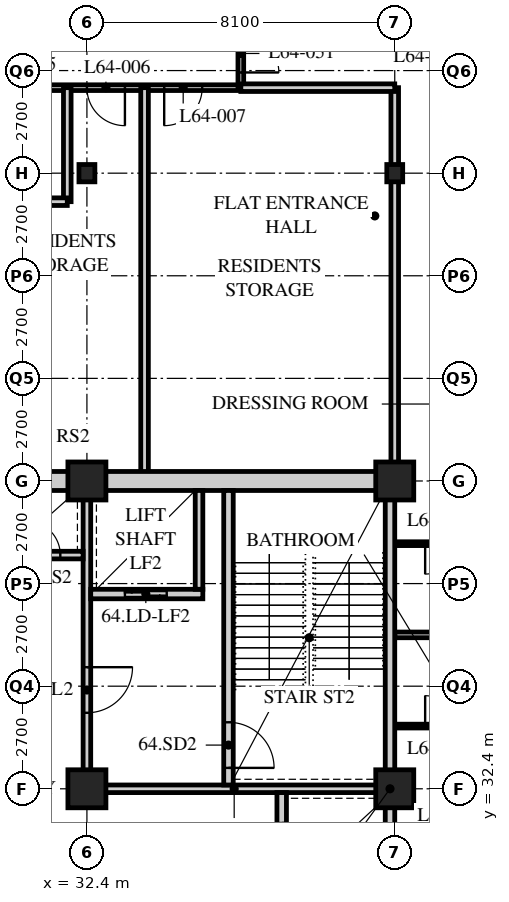
"""IFC4 building model, lengths in metres.
Left out: names, types, materials, properties, quantities, classifications, styles, units other than length and angle.
Written with IfcOpenShell. Run it as: python <this file> out.ifc"""

import sys

from ifc_helpers import new_model, si_unit, direction, frame, frame_2d, origin, origin_2d, place, context, subcontext, project, spatial, rectangle, hollow_rectangle, i_section, extrude, element, fill, save


model = new_model("IFC4")
c1 = context("Model", 3, precision=1e-05, world=origin(), true_north=direction((0.0, 1.0)))
c2 = subcontext(c1, "Body", "Model", "MODEL_VIEW")
j1 = project(units=[si_unit("LENGTHUNIT", "METRE"), si_unit("PLANEANGLEUNIT", "RADIAN")], contexts=[c1])
p1 = place(None, origin())
s1 = spatial("IfcSite", under=j1, at=p1, CompositionType="ELEMENT")
p2 = place(p1, origin())
s2 = spatial("IfcBuilding", under=s1, at=p2, CompositionType="ELEMENT")
p3 = place(p2, frame((0.0, 0.0, 250.2)))
s3 = spatial("IfcBuildingStorey", under=s2, at=p3, CompositionType="ELEMENT", Elevation=250.2)
for number, where, z_axis, x_axis in (
    (1, (32.4, 32.4, 0.0), (0.0, 0.0, 1.0), (1.0, 0.0, 0.0)),
    (2, (32.4, 40.5, 0.0), (0.0, 0.0, 1.0), (1.0, 0.0, 0.0)),
):
    element("IfcColumn", number, at=place(p3, frame(where, z_axis=z_axis, x_axis=x_axis)), inside=s3, PredefinedType="COLUMN", context=c2, shape_type="SweptSolid", body=[
        extrude(hollow_rectangle(XDim=1.0, YDim=1.0, WallThickness=0.1, at=origin_2d()), origin(), (0.0, 0.0, 1.0), 3.9),
    ])
p4 = place(p3, frame((32.4, 48.6, 0.0), z_axis=(0.0, 0.0, 1.0), x_axis=(1.0, 0.0, 0.0)))
e3 = element("IfcColumn", 3, at=p4, inside=s3, PredefinedType="COLUMN", context=c2, shape_type="SweptSolid", body=[
    extrude(i_section(OverallWidth=0.418, OverallDepth=0.456, WebThickness=0.042, FlangeThickness=0.067, FilletRadius=0.015, at=origin_2d()), origin(), (0.0, 0.0, 1.0), 3.9),
])
for number, where, z_axis, x_axis in (
    (4, (40.5, 32.4, 0.0), (0.0, 0.0, 1.0), (1.0, 0.0, 0.0)),
    (5, (40.5, 40.5, 0.0), (0.0, 0.0, 1.0), (1.0, 0.0, 0.0)),
):
    element("IfcColumn", number, at=place(p3, frame(where, z_axis=z_axis, x_axis=x_axis)), inside=s3, PredefinedType="COLUMN", context=c2, shape_type="SweptSolid", body=[
        extrude(hollow_rectangle(XDim=1.0, YDim=1.0, WallThickness=0.1, at=origin_2d()), origin(), (0.0, 0.0, 1.0), 3.9),
    ])
p5 = place(p3, frame((40.5, 48.6, 0.0), z_axis=(0.0, 0.0, 1.0), x_axis=(1.0, 0.0, 0.0)))
e6 = element("IfcColumn", 6, at=p5, inside=s3, PredefinedType="COLUMN", context=c2, shape_type="SweptSolid", body=[
    extrude(i_section(OverallWidth=0.418, OverallDepth=0.456, WebThickness=0.042, FlangeThickness=0.067, FilletRadius=0.015, at=origin_2d()), origin(), (0.0, 0.0, 1.0), 3.9),
])
p6 = place(p3, frame((29.56, 50.85, 0.0), z_axis=(0.0, 0.0, 1.0), x_axis=(1.0, 0.0, 0.0)))
e7 = element("IfcWall", 7, at=p6, inside=s3, PredefinedType="PARTITIONING", context=c2, shape_type="SweptSolid", body=[
    extrude(rectangle(XDim=6.89, YDim=0.15, at=frame_2d((3.445, 0.0))), origin(), (0.0, 0.0, 1.0), 3.69),
])
p7 = place(p6, frame((0.657, 0.0, 0.0)))
e8 = element("IfcOpeningElement", 8, at=p7, cuts=e7, PredefinedType="OPENING", context=c2, shape_type="SweptSolid", body=[
    extrude(rectangle(XDim=1.0, YDim=2.1, at=frame_2d((0.5, 1.05))), frame((0.0, 0.085, 0.0), z_axis=(0.0, -1.0, 0.0), x_axis=(1.0, 0.0, 0.0)), (0.0, 0.0, 1.0), 0.17),
])
p8 = place(p6, frame((2.84, 0.0, 0.0)))
e9 = element("IfcOpeningElement", 9, at=p8, cuts=e7, PredefinedType="OPENING", context=c2, shape_type="SweptSolid", body=[
    extrude(rectangle(XDim=1.0, YDim=2.1, at=frame_2d((0.5, 1.05))), frame((0.0, 0.085, 0.0), z_axis=(0.0, -1.0, 0.0), x_axis=(1.0, 0.0, 0.0)), (0.0, 0.0, 1.0), 0.17),
])
p9 = place(p6, frame((4.873, 0.0, 0.0)))
e10 = element("IfcOpeningElement", 10, at=p9, cuts=e7, PredefinedType="OPENING", context=c2, shape_type="SweptSolid", body=[
    extrude(rectangle(XDim=1.0, YDim=2.1, at=frame_2d((0.5, 1.05))), frame((0.0, 0.085, 0.0), z_axis=(0.0, -1.0, 0.0), x_axis=(1.0, 0.0, 0.0)), (0.0, 0.0, 1.0), 0.17),
])
p10 = place(p3, frame((31.883, 50.85, 0.0), z_axis=(0.0, 0.0, 1.0), x_axis=(0.0, -1.0, 0.0)))
e11 = element("IfcWall", 11, at=p10, inside=s3, PredefinedType="SOLIDWALL", context=c2, shape_type="SweptSolid", body=[
    extrude(rectangle(XDim=3.0, YDim=0.2, at=frame_2d((1.5, 0.0))), origin(), (0.0, 0.0, 1.0), 3.69),
])
p11 = place(p3, frame((29.55, 47.85, 0.0), z_axis=(0.0, 0.0, 1.0), x_axis=(1.0, 0.0, 0.0)))
e12 = element("IfcWall", 12, at=p11, inside=s3, PredefinedType="SOLIDWALL", context=c2, shape_type="SweptSolid", body=[
    extrude(rectangle(XDim=2.333, YDim=0.2, at=frame_2d((1.167, 0.0))), origin(), (0.0, 0.0, 1.0), 3.69),
])
p12 = place(p3, frame((33.917, 50.85, 0.0), z_axis=(0.0, 0.0, 1.0), x_axis=(0.0, -1.0, 0.0)))
e13 = element("IfcWall", 13, at=p12, inside=s3, PredefinedType="SOLIDWALL", context=c2, shape_type="SweptSolid", body=[
    extrude(rectangle(XDim=10.35, YDim=0.2, at=frame_2d((5.175, 0.0))), origin(), (0.0, 0.0, 1.0), 3.69),
])
p13 = place(p3, frame((36.45, 50.85, 0.0), z_axis=(0.0, 0.0, 1.0), x_axis=(0.0, 1.0, 0.0)))
e14 = element("IfcWall", 14, at=p13, inside=s3, PredefinedType="PARTITIONING", context=c2, shape_type="SweptSolid", body=[
    extrude(rectangle(XDim=1.8, YDim=0.15, at=frame_2d((0.9, 0.0))), origin(), (0.0, 0.0, 1.0), 3.69),
])
p14 = place(p13, frame((0.4, 0.0, 0.0)))
e15 = element("IfcOpeningElement", 15, at=p14, cuts=e14, PredefinedType="OPENING", context=c2, shape_type="SweptSolid", body=[
    extrude(rectangle(XDim=1.0, YDim=2.1, at=frame_2d((0.5, 1.05))), frame((0.0, 0.085, 0.0), z_axis=(0.0, -1.0, 0.0), x_axis=(1.0, 0.0, 0.0)), (0.0, 0.0, 1.0), 0.17),
])
p15 = place(p3, frame((40.5, 40.5, 0.0), z_axis=(0.0, 0.0, 1.0), x_axis=(0.0, 1.0, 0.0)))
e16 = element("IfcWall", 16, at=p15, inside=s3, PredefinedType="SOLIDWALL", context=c2, shape_type="SweptSolid", body=[
    extrude(rectangle(XDim=10.35, YDim=0.2, at=frame_2d((5.175, 0.0))), origin(), (0.0, 0.0, 1.0), 3.078),
])
p16 = place(p3, frame((40.5, 34.05, 0.0), z_axis=(0.0, 0.0, 1.0), x_axis=(1.0, 0.0, 0.0)))
e17 = element("IfcWall", 17, at=p16, inside=s3, PredefinedType="PARTITIONING", context=c2, shape_type="SweptSolid", body=[
    extrude(rectangle(XDim=2.4, YDim=0.1, at=frame_2d((1.2, 0.0))), origin(), (0.0, 0.0, 1.0), 3.69),
])
p17 = place(p16, frame((0.8, 0.0, 0.0)))
e18 = element("IfcOpeningElement", 18, at=p17, cuts=e17, PredefinedType="OPENING", context=c2, shape_type="SweptSolid", body=[
    extrude(rectangle(XDim=0.8, YDim=2.1, at=frame_2d((0.4, 1.05))), frame((0.0, 0.06, 0.0), z_axis=(0.0, -1.0, 0.0), x_axis=(1.0, 0.0, 0.0)), (0.0, 0.0, 1.0), 0.12),
])
p18 = place(p3, frame((40.5, 36.45, 0.0), z_axis=(0.0, 0.0, 1.0), x_axis=(1.0, 0.0, 0.0)))
e19 = element("IfcWall", 19, at=p18, inside=s3, PredefinedType="PARTITIONING", context=c2, shape_type="SweptSolid", body=[
    extrude(rectangle(XDim=15.9, YDim=0.15, at=frame_2d((7.95, 0.0))), origin(), (0.0, 0.0, 1.0), 3.69),
])
p19 = place(p3, frame((40.5, 38.85, 0.0), z_axis=(0.0, 0.0, 1.0), x_axis=(1.0, 0.0, 0.0)))
e20 = element("IfcWall", 20, at=p19, inside=s3, PredefinedType="PARTITIONING", context=c2, shape_type="SweptSolid", body=[
    extrude(rectangle(XDim=2.4, YDim=0.1, at=frame_2d((1.2, 0.0))), origin(), (0.0, 0.0, 1.0), 3.69),
])
p20 = place(p19, frame((0.8, 0.0, 0.0)))
e21 = element("IfcOpeningElement", 21, at=p20, cuts=e20, PredefinedType="OPENING", context=c2, shape_type="SweptSolid", body=[
    extrude(rectangle(XDim=0.8, YDim=2.1, at=frame_2d((0.4, 1.05))), frame((0.0, 0.06, 0.0), z_axis=(0.0, -1.0, 0.0), x_axis=(1.0, 0.0, 0.0)), (0.0, 0.0, 1.0), 0.12),
])
p21 = place(p3, frame((36.45, 50.85, 0.0), z_axis=(0.0, 0.0, 1.0), x_axis=(1.0, 0.0, 0.0)))
e22 = element("IfcWall", 22, at=p21, inside=s3, PredefinedType="SOLIDWALL", context=c2, shape_type="SweptSolid", body=[
    extrude(rectangle(XDim=4.05, YDim=0.2, at=frame_2d((2.025, 0.0))), origin(), (0.0, 0.0, 1.0), 3.69),
])
p22 = place(p3, frame((15.95, 40.5, 0.0), z_axis=(0.0, 0.0, 1.0), x_axis=(1.0, 0.0, 0.0)))
e23 = element("IfcWall", 23, at=p22, inside=s3, PredefinedType="SOLIDWALL", context=c2, shape_type="SweptSolid", body=[
    extrude(rectangle(XDim=24.55, YDim=0.5, at=frame_2d((12.275, 0.0))), origin(), (0.0, 0.0, 1.0), 3.04),
])
p23 = place(p22, frame((11.5, 0.0, 0.0)))
e24 = element("IfcOpeningElement", 24, at=p23, cuts=e23, PredefinedType="OPENING", context=c2, shape_type="SweptSolid", body=[
    extrude(rectangle(XDim=1.8, YDim=2.4, at=frame_2d((0.9, 1.2))), frame((0.0, 0.26, 0.0), z_axis=(0.0, -1.0, 0.0), x_axis=(1.0, 0.0, 0.0)), (0.0, 0.0, 1.0), 0.52),
])
p24 = place(p3, frame((40.375, 24.55, 0.0), z_axis=(0.0, 0.0, 1.0), x_axis=(0.0, 1.0, 0.0)))
e25 = element("IfcWall", 25, at=p24, inside=s3, PredefinedType="SOLIDWALL", context=c2, shape_type="SweptSolid", body=[
    extrude(rectangle(XDim=15.7, YDim=0.25, at=frame_2d((7.85, 0.0))), origin(), (0.0, 0.0, 1.0), 3.078),
])
p25 = place(p3, frame((32.3, 32.4, 0.0), z_axis=(0.0, 0.0, 1.0), x_axis=(1.0, 0.0, 0.0)))
e26 = element("IfcWall", 26, at=p25, inside=s3, PredefinedType="SOLIDWALL", context=c2, shape_type="SweptSolid", body=[
    extrude(rectangle(XDim=7.95, YDim=0.2, at=frame_2d((3.975, 0.0))), origin(), (0.0, 0.0, 1.0), 3.078),
])
p26 = place(p3, frame((32.4, 32.5, 0.0), z_axis=(0.0, 0.0, 1.0), x_axis=(0.0, 1.0, 0.0)))
e27 = element("IfcWall", 27, at=p26, inside=s3, PredefinedType="SOLIDWALL", context=c2, shape_type="SweptSolid", body=[
    extrude(rectangle(XDim=7.75, YDim=0.2, at=frame_2d((3.875, 0.0))), origin(), (0.0, 0.0, 1.0), 3.078),
])
p27 = place(p26, frame((1.9, 0.0, 0.0)))
e28 = element("IfcOpeningElement", 28, at=p27, cuts=e27, PredefinedType="OPENING", context=c2, shape_type="SweptSolid", body=[
    extrude(rectangle(XDim=1.2, YDim=2.1, at=frame_2d((0.6, 1.05))), frame((0.0, 0.11, 0.0), z_axis=(0.0, -1.0, 0.0), x_axis=(1.0, 0.0, 0.0)), (0.0, 0.0, 1.0), 0.22),
])
p28 = place(p3, frame((37.525, 24.55, 0.0), z_axis=(0.0, 0.0, 1.0), x_axis=(0.0, 1.0, 0.0)))
e29 = element("IfcWall", 29, at=p28, inside=s3, PredefinedType="SOLIDWALL", context=c2, shape_type="SweptSolid", body=[
    extrude(rectangle(XDim=7.75, YDim=0.25, at=frame_2d((3.875, 0.0))), origin(), (0.0, 0.0, 1.0), 3.69),
])
p29 = place(p28, frame((0.65, 0.0, 0.0)))
e30 = element("IfcOpeningElement", 30, at=p29, cuts=e29, PredefinedType="OPENING", context=c2, shape_type="SweptSolid", body=[
    extrude(rectangle(XDim=1.1, YDim=2.4, at=frame_2d((0.55, 1.2))), frame((0.0, 0.135, 0.0), z_axis=(0.0, -1.0, 0.0), x_axis=(1.0, 0.0, 0.0)), (0.0, 0.0, 1.0), 0.27),
])
p30 = place(p28, frame((3.25, 0.0, 0.0)))
e31 = element("IfcOpeningElement", 31, at=p30, cuts=e29, PredefinedType="OPENING", context=c2, shape_type="SweptSolid", body=[
    extrude(rectangle(XDim=1.1, YDim=2.4, at=frame_2d((0.55, 1.2))), frame((0.0, 0.135, 0.0), z_axis=(0.0, -1.0, 0.0), x_axis=(1.0, 0.0, 0.0)), (0.0, 0.0, 1.0), 0.27),
])
p31 = place(p28, frame((5.85, 0.0, 0.0)))
e32 = element("IfcOpeningElement", 32, at=p31, cuts=e29, PredefinedType="OPENING", context=c2, shape_type="SweptSolid", body=[
    extrude(rectangle(XDim=1.1, YDim=2.4, at=frame_2d((0.55, 1.2))), frame((0.0, 0.135, 0.0), z_axis=(0.0, -1.0, 0.0), x_axis=(1.0, 0.0, 0.0)), (0.0, 0.0, 1.0), 0.27),
])
p32 = place(p3, frame((36.125, 32.5, 0.0), z_axis=(0.0, 0.0, 1.0), x_axis=(0.0, 1.0, 0.0)))
e33 = element("IfcWall", 33, at=p32, inside=s3, PredefinedType="SOLIDWALL", context=c2, shape_type="SweptSolid", body=[
    extrude(rectangle(XDim=7.75, YDim=0.25, at=frame_2d((3.875, 0.0))), origin(), (0.0, 0.0, 1.0), 3.69),
])
p33 = place(p32, frame((0.45, 0.0, 0.0)))
e34 = element("IfcOpeningElement", 34, at=p33, cuts=e33, PredefinedType="OPENING", context=c2, shape_type="SweptSolid", body=[
    extrude(rectangle(XDim=1.2, YDim=2.1, at=frame_2d((0.6, 1.05))), frame((0.0, 0.135, 0.0), z_axis=(0.0, -1.0, 0.0), x_axis=(1.0, 0.0, 0.0)), (0.0, 0.0, 1.0), 0.27),
])
p34 = place(p3, frame((32.5, 37.525, 0.0), z_axis=(0.0, 0.0, 1.0), x_axis=(1.0, 0.0, 0.0)))
e35 = element("IfcWall", 35, at=p34, inside=s3, PredefinedType="SOLIDWALL", context=c2, shape_type="SweptSolid", body=[
    extrude(rectangle(XDim=2.95, YDim=0.25, at=frame_2d((1.475, 0.0))), origin(), (0.0, 0.0, 1.0), 3.69),
])
p35 = place(p34, frame((0.9, 0.0, 0.0)))
e36 = element("IfcOpeningElement", 36, at=p35, cuts=e35, PredefinedType="OPENING", context=c2, shape_type="SweptSolid", body=[
    extrude(rectangle(XDim=1.1, YDim=2.4, at=frame_2d((0.55, 1.2))), frame((0.0, 0.135, 0.0), z_axis=(0.0, -1.0, 0.0), x_axis=(1.0, 0.0, 0.0)), (0.0, 0.0, 1.0), 0.27),
])
p36 = place(p3, frame((35.35, 37.65, 0.0), z_axis=(0.0, 0.0, 1.0), x_axis=(0.0, 1.0, 0.0)))
e37 = element("IfcWall", 37, at=p36, inside=s3, PredefinedType="SOLIDWALL", context=c2, shape_type="SweptSolid", body=[
    extrude(rectangle(XDim=2.6, YDim=0.2, at=frame_2d((1.3, 0.0))), origin(), (0.0, 0.0, 1.0), 3.69),
])
p37 = place(p3, frame((30.15, 38.55, 0.0), z_axis=(0.0, 0.0, 1.0), x_axis=(1.0, 0.0, 0.0)))
e38 = element("IfcWall", 38, at=p37, inside=s3, PredefinedType="SOLIDWALL", context=c2, shape_type="SweptSolid", body=[
    extrude(rectangle(XDim=2.15, YDim=0.2, at=frame_2d((1.075, 0.0))), origin(), (0.0, 0.0, 1.0), 3.69),
])
p38 = place(p37, frame((0.65, 0.0, 0.0)))
e39 = element("IfcOpeningElement", 39, at=p38, cuts=e38, PredefinedType="OPENING", context=c2, shape_type="SweptSolid", body=[
    extrude(rectangle(XDim=0.9, YDim=2.1, at=frame_2d((0.45, 1.05))), frame((0.0, 0.11, 0.0), z_axis=(0.0, -1.0, 0.0), x_axis=(1.0, 0.0, 0.0)), (0.0, 0.0, 1.0), 0.22),
])
p39 = place(p8, origin())
e40 = element("IfcDoor", 40, at=p39, inside=s3, OperationType="SINGLE_SWING_LEFT", PredefinedType="DOOR", context=c2, shape_type="SweptSolid", body=[
    extrude(rectangle(XDim=1.0, YDim=2.1, at=frame_2d((0.5, 1.05))), frame((0.0, 0.025, 0.0), z_axis=(0.0, -1.0, 0.0), x_axis=(1.0, 0.0, 0.0)), (0.0, 0.0, 1.0), 0.05),
])
fill(e9, e40)
p40 = place(p9, origin())
e41 = element("IfcDoor", 41, at=p40, inside=s3, OperationType="SINGLE_SWING_RIGHT", PredefinedType="DOOR", context=c2, shape_type="SweptSolid", body=[
    extrude(rectangle(XDim=1.0, YDim=2.1, at=frame_2d((0.5, 1.05))), frame((0.0, 0.025, 0.0), z_axis=(0.0, -1.0, 0.0), x_axis=(1.0, 0.0, 0.0)), (0.0, 0.0, 1.0), 0.05),
])
fill(e10, e41)
p41 = place(p17, origin())
e42 = element("IfcDoor", 42, at=p41, inside=s3, OperationType="SINGLE_SWING_LEFT", PredefinedType="DOOR", context=c2, shape_type="SweptSolid", body=[
    extrude(rectangle(XDim=0.8, YDim=2.1, at=frame_2d((0.4, 1.05))), frame((0.0, 0.025, 0.0), z_axis=(0.0, -1.0, 0.0), x_axis=(1.0, 0.0, 0.0)), (0.0, 0.0, 1.0), 0.05),
])
fill(e18, e42)
p42 = place(p14, origin())
e43 = element("IfcDoor", 43, at=p42, inside=s3, OperationType="SINGLE_SWING_RIGHT", PredefinedType="DOOR", context=c2, shape_type="SweptSolid", body=[
    extrude(rectangle(XDim=1.0, YDim=2.1, at=frame_2d((0.5, 1.05))), frame((0.0, 0.025, 0.0), z_axis=(0.0, -1.0, 0.0), x_axis=(1.0, 0.0, 0.0)), (0.0, 0.0, 1.0), 0.05),
])
fill(e15, e43)
p43 = place(p20, origin())
e44 = element("IfcDoor", 44, at=p43, inside=s3, OperationType="SINGLE_SWING_RIGHT", PredefinedType="DOOR", context=c2, shape_type="SweptSolid", body=[
    extrude(rectangle(XDim=0.8, YDim=2.1, at=frame_2d((0.4, 1.05))), frame((0.0, 0.025, 0.0), z_axis=(0.0, -1.0, 0.0), x_axis=(1.0, 0.0, 0.0)), (0.0, 0.0, 1.0), 0.05),
])
fill(e21, e44)
p44 = place(p33, origin())
e45 = element("IfcDoor", 45, at=p44, inside=s3, OperationType="SINGLE_SWING_RIGHT", PredefinedType="DOOR", context=c2, shape_type="SweptSolid", body=[
    extrude(rectangle(XDim=1.2, YDim=2.1, at=frame_2d((0.6, 1.05))), frame((0.0, 0.025, 0.0), z_axis=(0.0, -1.0, 0.0), x_axis=(1.0, 0.0, 0.0)), (0.0, 0.0, 1.0), 0.05),
])
fill(e34, e45)
p45 = place(p27, origin())
e46 = element("IfcDoor", 46, at=p45, inside=s3, OperationType="SINGLE_SWING_LEFT", PredefinedType="DOOR", context=c2, shape_type="SweptSolid", body=[
    extrude(rectangle(XDim=1.2, YDim=2.1, at=frame_2d((0.6, 1.05))), frame((0.0, 0.025, 0.0), z_axis=(0.0, -1.0, 0.0), x_axis=(1.0, 0.0, 0.0)), (0.0, 0.0, 1.0), 0.05),
])
fill(e28, e46)
p46 = place(p38, origin())
e47 = element("IfcDoor", 47, at=p46, inside=s3, OperationType="SINGLE_SWING_LEFT", PredefinedType="DOOR", context=c2, shape_type="SweptSolid", body=[
    extrude(rectangle(XDim=0.9, YDim=2.1, at=frame_2d((0.45, 1.05))), frame((0.0, 0.025, 0.0), z_axis=(0.0, -1.0, 0.0), x_axis=(1.0, 0.0, 0.0)), (0.0, 0.0, 1.0), 0.05),
])
fill(e39, e47)
p47 = place(p31, origin())
e48 = element("IfcDoor", 48, at=p47, inside=s3, OperationType="DOUBLE_DOOR_SLIDING", PredefinedType="DOOR", context=c2, shape_type="SweptSolid", body=[
    extrude(rectangle(XDim=1.1, YDim=2.4, at=frame_2d((0.55, 1.2))), frame((0.0, 0.025, 0.0), z_axis=(0.0, -1.0, 0.0), x_axis=(1.0, 0.0, 0.0)), (0.0, 0.0, 1.0), 0.05),
])
fill(e32, e48)
p48 = place(p35, origin())
e49 = element("IfcDoor", 49, at=p48, inside=s3, OperationType="DOUBLE_DOOR_SLIDING", PredefinedType="DOOR", context=c2, shape_type="SweptSolid", body=[
    extrude(rectangle(XDim=1.1, YDim=2.4, at=frame_2d((0.55, 1.2))), frame((0.0, 0.025, 0.0), z_axis=(0.0, -1.0, 0.0), x_axis=(1.0, 0.0, 0.0)), (0.0, 0.0, 1.0), 0.05),
])
fill(e36, e49)
save(model, sys.argv[1])
